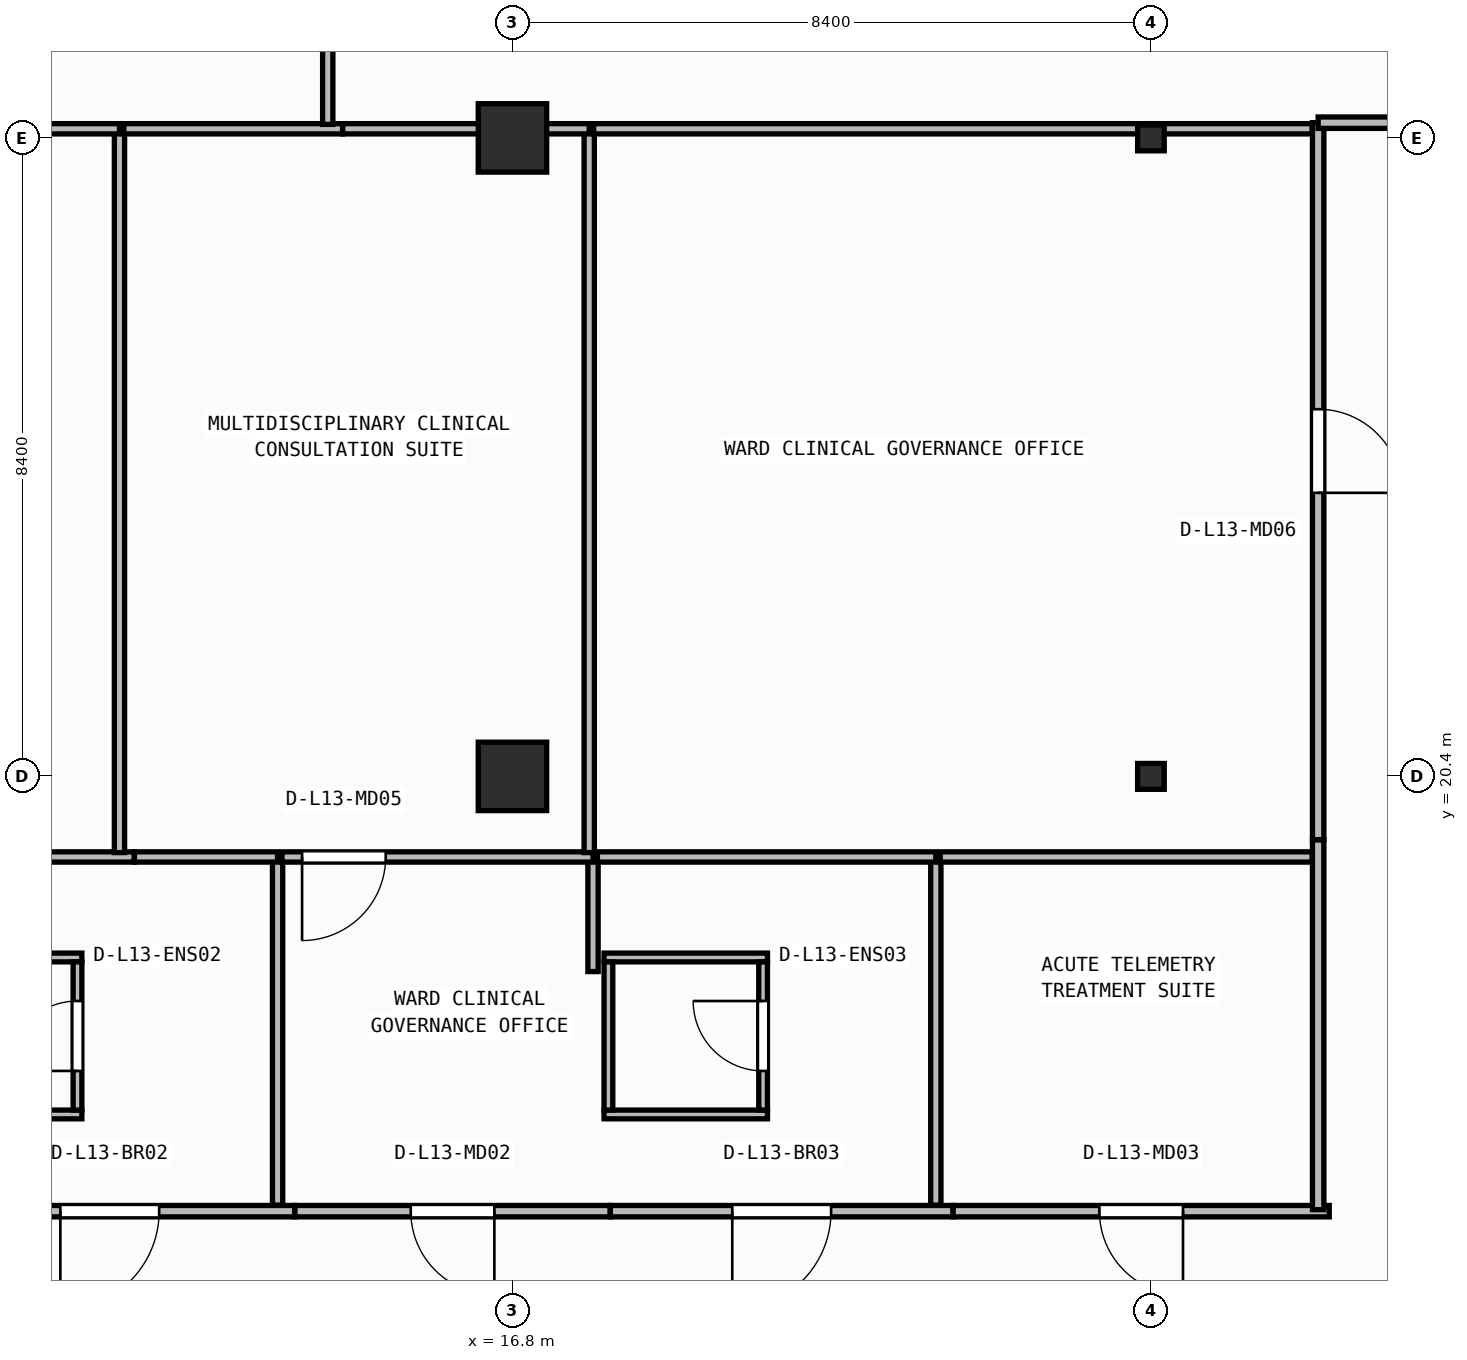
"""IFC4 building model, lengths in metres.
Left out: names, types, materials, properties, quantities, classifications, styles, units other than length and angle.
Written with IfcOpenShell. Run it as: python <this file> out.ifc"""

import sys

from ifc_helpers import new_model, si_unit, direction, frame, frame_2d, origin, origin_2d, place, context, subcontext, project, spatial, rectangle, i_section, extrude, element, fill, save


model = new_model("IFC4")
c1 = context("Model", 3, precision=1e-05, world=origin(), true_north=direction((0.0, 1.0)))
c2 = subcontext(c1, "Body", "Model", "MODEL_VIEW")
j1 = project(units=[si_unit("LENGTHUNIT", "METRE"), si_unit("PLANEANGLEUNIT", "RADIAN")], contexts=[c1])
p1 = place(None, origin())
s1 = spatial("IfcSite", under=j1, at=p1, CompositionType="ELEMENT")
p2 = place(p1, origin())
s2 = spatial("IfcBuilding", under=s1, at=p2, CompositionType="ELEMENT")
p3 = place(p2, frame((0.0, 0.0, 54.1)))
s3 = spatial("IfcBuildingStorey", under=s2, at=p3, CompositionType="ELEMENT", Elevation=54.1)
p4 = place(p3, frame((16.8, 20.4, 0.0), z_axis=(0.0, 0.0, 1.0), x_axis=(1.0, 0.0, 0.0)))
e1 = element("IfcColumn", 1, at=p4, inside=s3, PredefinedType="COLUMN", context=c2, shape_type="SweptSolid", body=[
    extrude(rectangle(XDim=0.9, YDim=0.9, at=origin_2d()), origin(), (0.0, 0.0, 1.0), 3.95),
])
p5 = place(p3, frame((25.2, 20.4, 0.0), z_axis=(0.0, 0.0, 1.0), x_axis=(1.0, 0.0, 0.0)))
e2 = element("IfcColumn", 2, at=p5, inside=s3, PredefinedType="COLUMN", context=c2, shape_type="SweptSolid", body=[
    extrude(i_section(OverallWidth=0.35, OverallDepth=0.34, WebThickness=0.016, FlangeThickness=0.028, at=origin_2d()), origin(), (0.0, 0.0, 1.0), 3.95),
])
p6 = place(p3, frame((16.8, 28.8, 0.0), z_axis=(0.0, 0.0, 1.0), x_axis=(1.0, 0.0, 0.0)))
e3 = element("IfcColumn", 3, at=p6, inside=s3, PredefinedType="COLUMN", context=c2, shape_type="SweptSolid", body=[
    extrude(rectangle(XDim=0.9, YDim=0.9, at=origin_2d()), origin(), (0.0, 0.0, 1.0), 3.95),
])
p7 = place(p3, frame((25.2, 28.8, 0.0), z_axis=(0.0, 0.0, 1.0), x_axis=(1.0, 0.0, 0.0)))
e4 = element("IfcColumn", 4, at=p7, inside=s3, PredefinedType="COLUMN", context=c2, shape_type="SweptSolid", body=[
    extrude(i_section(OverallWidth=0.35, OverallDepth=0.34, WebThickness=0.016, FlangeThickness=0.028, at=origin_2d()), origin(), (0.0, 0.0, 1.0), 3.95),
])
for number, where, z_axis, x_axis in (
    (5, (8.985, 15.952, 0.0), (0.0, 0.0, 1.0), (1.0, 0.0, 0.0)),
    (6, (8.985, 18.018, 0.0), (0.0, 0.0, 1.0), (1.0, 0.0, 0.0)),
):
    element("IfcWall", number, at=place(p3, frame(where, z_axis=z_axis, x_axis=x_axis)), inside=s3, PredefinedType="PARTITIONING", context=c2, shape_type="SweptSolid", body=[
        extrude(rectangle(XDim=2.15, YDim=0.115, at=frame_2d((1.075, 0.0))), origin(), (0.0, 0.0, 1.0), 3.71),
    ])
p8 = place(p3, frame((11.077, 16.01, 0.0), z_axis=(0.0, 0.0, 1.0), x_axis=(0.0, 1.0, 0.0)))
e7 = element("IfcWall", 7, at=p8, inside=s3, PredefinedType="PARTITIONING", context=c2, shape_type="SweptSolid", body=[
    extrude(rectangle(XDim=1.95, YDim=0.115, at=frame_2d((0.975, 0.0))), origin(), (0.0, 0.0, 1.0), 3.71),
])
p9 = place(p8, frame((0.515, 0.0, 0.0)))
e8 = element("IfcOpeningElement", 8, at=p9, cuts=e7, PredefinedType="OPENING", context=c2, shape_type="SweptSolid", body=[
    extrude(rectangle(XDim=0.92, YDim=2.1, at=frame_2d((0.46, 1.05))), frame((0.0, 0.067, 0.0), z_axis=(0.0, -1.0, 0.0), x_axis=(1.0, 0.0, 0.0)), (0.0, 0.0, 1.0), 0.135),
])
for number, where, z_axis, x_axis in (
    (9, (18.005, 15.952, 0.0), (0.0, 0.0, 1.0), (1.0, 0.0, 0.0)),
    (10, (18.005, 18.018, 0.0), (0.0, 0.0, 1.0), (1.0, 0.0, 0.0)),
):
    element("IfcWall", number, at=place(p3, frame(where, z_axis=z_axis, x_axis=x_axis)), inside=s3, PredefinedType="PARTITIONING", context=c2, shape_type="SweptSolid", body=[
        extrude(rectangle(XDim=2.15, YDim=0.115, at=frame_2d((1.075, 0.0))), origin(), (0.0, 0.0, 1.0), 3.71),
    ])
p10 = place(p3, frame((18.062, 16.01, 0.0), z_axis=(0.0, 0.0, 1.0), x_axis=(0.0, 1.0, 0.0)))
e11 = element("IfcWall", 11, at=p10, inside=s3, PredefinedType="PARTITIONING", context=c2, shape_type="SweptSolid", body=[
    extrude(rectangle(XDim=1.95, YDim=0.115, at=frame_2d((0.975, 0.0))), origin(), (0.0, 0.0, 1.0), 3.71),
])
p11 = place(p3, frame((20.097, 16.01, 0.0), z_axis=(0.0, 0.0, 1.0), x_axis=(0.0, 1.0, 0.0)))
e12 = element("IfcWall", 12, at=p11, inside=s3, PredefinedType="PARTITIONING", context=c2, shape_type="SweptSolid", body=[
    extrude(rectangle(XDim=1.95, YDim=0.115, at=frame_2d((0.975, 0.0))), origin(), (0.0, 0.0, 1.0), 3.71),
])
p12 = place(p11, frame((0.515, 0.0, 0.0)))
e13 = element("IfcOpeningElement", 13, at=p12, cuts=e12, PredefinedType="OPENING", context=c2, shape_type="SweptSolid", body=[
    extrude(rectangle(XDim=0.92, YDim=2.1, at=frame_2d((0.46, 1.05))), frame((0.0, 0.067, 0.0), z_axis=(0.0, -1.0, 0.0), x_axis=(1.0, 0.0, 0.0)), (0.0, 0.0, 1.0), 0.135),
])
p13 = place(p3, frame((13.936, 14.68, 0.0), z_axis=(0.0, 0.0, 1.0), x_axis=(-1.0, 0.0, 0.0)))
e14 = element("IfcWall", 14, at=p13, inside=s3, PredefinedType="PARTITIONING", context=c2, shape_type="SweptSolid", body=[
    extrude(rectangle(XDim=4.868, YDim=0.15, at=frame_2d((2.434, 0.0))), origin(), (0.0, 0.0, 1.0), 3.71),
])
p14 = place(p13, frame((1.784, 0.0, 0.0)))
e15 = element("IfcOpeningElement", 15, at=p14, cuts=e14, PredefinedType="OPENING", context=c2, shape_type="SweptSolid", body=[
    extrude(rectangle(XDim=1.3, YDim=2.15, at=frame_2d((0.65, 1.075))), frame((0.0, 0.085, 0.0), z_axis=(0.0, -1.0, 0.0), x_axis=(1.0, 0.0, 0.0)), (0.0, 0.0, 1.0), 0.17),
])
p15 = place(p3, frame((18.086, 14.68, 0.0), z_axis=(0.0, 0.0, 1.0), x_axis=(-1.0, 0.0, 0.0)))
e16 = element("IfcWall", 16, at=p15, inside=s3, PredefinedType="PARTITIONING", context=c2, shape_type="SweptSolid", body=[
    extrude(rectangle(XDim=4.148, YDim=0.15, at=frame_2d((2.074, 0.0))), origin(), (0.0, 0.0, 1.0), 3.71),
])
p16 = place(p15, frame((1.524, 0.0, 0.0)))
e17 = element("IfcOpeningElement", 17, at=p16, cuts=e16, PredefinedType="OPENING", context=c2, shape_type="SweptSolid", body=[
    extrude(rectangle(XDim=1.1, YDim=2.1, at=frame_2d((0.55, 1.05))), frame((0.0, 0.085, 0.0), z_axis=(0.0, -1.0, 0.0), x_axis=(1.0, 0.0, 0.0)), (0.0, 0.0, 1.0), 0.17),
])
p17 = place(p3, frame((22.596, 14.68, 0.0), z_axis=(0.0, 0.0, 1.0), x_axis=(-1.0, 0.0, 0.0)))
e18 = element("IfcWall", 18, at=p17, inside=s3, PredefinedType="PARTITIONING", context=c2, shape_type="SweptSolid", body=[
    extrude(rectangle(XDim=4.508, YDim=0.15, at=frame_2d((2.254, 0.0))), origin(), (0.0, 0.0, 1.0), 3.71),
])
p18 = place(p17, frame((1.604, 0.0, 0.0)))
e19 = element("IfcOpeningElement", 19, at=p18, cuts=e18, PredefinedType="OPENING", context=c2, shape_type="SweptSolid", body=[
    extrude(rectangle(XDim=1.3, YDim=2.15, at=frame_2d((0.65, 1.075))), frame((0.0, 0.085, 0.0), z_axis=(0.0, -1.0, 0.0), x_axis=(1.0, 0.0, 0.0)), (0.0, 0.0, 1.0), 0.17),
])
p19 = place(p3, frame((27.546, 14.68, 0.0), z_axis=(0.0, 0.0, 1.0), x_axis=(-1.0, 0.0, 0.0)))
e20 = element("IfcWall", 20, at=p19, inside=s3, PredefinedType="PARTITIONING", context=c2, shape_type="SweptSolid", body=[
    extrude(rectangle(XDim=4.948, YDim=0.15, at=frame_2d((2.474, 0.0))), origin(), (0.0, 0.0, 1.0), 3.71),
])
p20 = place(p19, frame((1.924, 0.0, 0.0)))
e21 = element("IfcOpeningElement", 21, at=p20, cuts=e20, PredefinedType="OPENING", context=c2, shape_type="SweptSolid", body=[
    extrude(rectangle(XDim=1.1, YDim=2.1, at=frame_2d((0.55, 1.05))), frame((0.0, 0.085, 0.0), z_axis=(0.0, -1.0, 0.0), x_axis=(1.0, 0.0, 0.0)), (0.0, 0.0, 1.0), 0.17),
])
p21 = place(p3, frame((27.4, 19.566, 0.0), z_axis=(0.0, 0.0, 1.0), x_axis=(0.0, -1.0, 0.0)))
e22 = element("IfcWall", 22, at=p21, inside=s3, PredefinedType="PARTITIONING", context=c2, shape_type="SweptSolid", body=[
    extrude(rectangle(XDim=4.866, YDim=0.15, at=frame_2d((2.433, 0.0))), origin(), (0.0, 0.0, 1.0), 3.71),
])
p22 = place(p3, frame((27.4, 29.0, 0.0), z_axis=(0.0, 0.0, 1.0), x_axis=(0.0, -1.0, 0.0)))
e23 = element("IfcWall", 23, at=p22, inside=s3, PredefinedType="PARTITIONING", context=c2, shape_type="SweptSolid", body=[
    extrude(rectangle(XDim=9.432, YDim=0.15, at=frame_2d((4.716, 0.0))), origin(), (0.0, 0.0, 1.0), 3.71),
])
p23 = place(p22, frame((3.769, 0.0, 0.0)))
e24 = element("IfcOpeningElement", 24, at=p23, cuts=e23, PredefinedType="OPENING", context=c2, shape_type="SweptSolid", body=[
    extrude(rectangle(XDim=1.1, YDim=2.1, at=frame_2d((0.55, 1.05))), frame((0.0, 0.085, 0.0), z_axis=(0.0, -1.0, 0.0), x_axis=(1.0, 0.0, 0.0)), (0.0, 0.0, 1.0), 0.17),
])
p24 = place(p3, frame((29.9, 29.0, 0.0), z_axis=(0.0, 0.0, 1.0), x_axis=(-1.0, 0.0, 0.0)))
e25 = element("IfcWall", 25, at=p24, inside=s3, PredefinedType="PARTITIONING", context=c2, shape_type="SweptSolid", body=[
    extrude(rectangle(XDim=2.5, YDim=0.15, at=frame_2d((1.25, 0.0))), origin(), (0.0, 0.0, 1.0), 3.326),
])
p25 = place(p24, frame((0.225, 0.0, 0.0)))
e26 = element("IfcOpeningElement", 26, at=p25, cuts=e25, PredefinedType="OPENING", context=c2, shape_type="SweptSolid", body=[
    extrude(rectangle(XDim=1.1, YDim=2.1, at=frame_2d((0.55, 1.05))), frame((0.0, 0.085, 0.0), z_axis=(0.0, -1.0, 0.0), x_axis=(1.0, 0.0, 0.0)), (0.0, 0.0, 1.0), 0.17),
])
p26 = place(p3, frame((13.71, 14.76, 0.0), z_axis=(0.0, 0.0, 1.0), x_axis=(0.0, 1.0, 0.0)))
e27 = element("IfcWall", 27, at=p26, inside=s3, PredefinedType="PARTITIONING", context=c2, shape_type="SweptSolid", body=[
    extrude(rectangle(XDim=4.58, YDim=0.135, at=frame_2d((2.29, 0.0))), origin(), (0.0, 0.0, 1.0), 3.71),
])
p27 = place(p3, frame((11.825, 19.34, 0.0), z_axis=(0.0, 0.0, 1.0), x_axis=(-1.0, 0.0, 0.0)))
e28 = element("IfcWall", 28, at=p27, inside=s3, PredefinedType="PARTITIONING", context=c2, shape_type="SweptSolid", body=[
    extrude(rectangle(XDim=2.927, YDim=0.135, at=frame_2d((1.464, 0.0))), origin(), (0.0, 0.0, 1.0), 3.71),
])
p28 = place(p3, frame((13.71, 19.34, 0.0), z_axis=(0.0, 0.0, 1.0), x_axis=(-1.0, 0.0, 0.0)))
e29 = element("IfcWall", 29, at=p28, inside=s3, PredefinedType="PARTITIONING", context=c2, shape_type="SweptSolid", body=[
    extrude(rectangle(XDim=1.883, YDim=0.135, at=frame_2d((0.942, 0.0))), origin(), (0.0, 0.0, 1.0), 3.71),
])
p29 = place(p3, frame((17.86, 17.833, 0.0), z_axis=(0.0, 0.0, 1.0), x_axis=(0.0, 1.0, 0.0)))
e30 = element("IfcWall", 30, at=p29, inside=s3, PredefinedType="PARTITIONING", context=c2, shape_type="SweptSolid", body=[
    extrude(rectangle(XDim=1.508, YDim=0.135, at=frame_2d((0.754, 0.0))), origin(), (0.0, 0.0, 1.0), 3.71),
])
p30 = place(p3, frame((17.86, 19.34, 0.0), z_axis=(0.0, 0.0, 1.0), x_axis=(-1.0, 0.0, 0.0)))
e31 = element("IfcWall", 31, at=p30, inside=s3, PredefinedType="PARTITIONING", context=c2, shape_type="SweptSolid", body=[
    extrude(rectangle(XDim=4.093, YDim=0.135, at=frame_2d((2.046, 0.0))), origin(), (0.0, 0.0, 1.0), 3.71),
])
p31 = place(p30, frame((2.728, 0.0, 0.0)))
e32 = element("IfcOpeningElement", 32, at=p31, cuts=e31, PredefinedType="OPENING", context=c2, shape_type="SweptSolid", body=[
    extrude(rectangle(XDim=1.1, YDim=2.1, at=frame_2d((0.55, 1.05))), frame((0.0, 0.077, 0.0), z_axis=(0.0, -1.0, 0.0), x_axis=(1.0, 0.0, 0.0)), (0.0, 0.0, 1.0), 0.155),
])
p32 = place(p3, frame((22.37, 14.76, 0.0), z_axis=(0.0, 0.0, 1.0), x_axis=(0.0, 1.0, 0.0)))
e33 = element("IfcWall", 33, at=p32, inside=s3, PredefinedType="PARTITIONING", context=c2, shape_type="SweptSolid", body=[
    extrude(rectangle(XDim=4.58, YDim=0.135, at=frame_2d((2.29, 0.0))), origin(), (0.0, 0.0, 1.0), 3.71),
])
p33 = place(p3, frame((22.37, 19.34, 0.0), z_axis=(0.0, 0.0, 1.0), x_axis=(-1.0, 0.0, 0.0)))
e34 = element("IfcWall", 34, at=p33, inside=s3, PredefinedType="PARTITIONING", context=c2, shape_type="SweptSolid", body=[
    extrude(rectangle(XDim=4.453, YDim=0.135, at=frame_2d((2.226, 0.0))), origin(), (0.0, 0.0, 1.0), 3.71),
])
p34 = place(p3, frame((27.32, 19.34, 0.0), z_axis=(0.0, 0.0, 1.0), x_axis=(-1.0, 0.0, 0.0)))
e35 = element("IfcWall", 35, at=p34, inside=s3, PredefinedType="PARTITIONING", context=c2, shape_type="SweptSolid", body=[
    extrude(rectangle(XDim=4.893, YDim=0.135, at=frame_2d((2.446, 0.0))), origin(), (0.0, 0.0, 1.0), 3.71),
])
p35 = place(p3, frame((11.63, 19.397, 0.0), z_axis=(0.0, 0.0, 1.0), x_axis=(0.0, 1.0, 0.0)))
e36 = element("IfcWall", 36, at=p35, inside=s3, PredefinedType="PARTITIONING", context=c2, shape_type="SweptSolid", body=[
    extrude(rectangle(XDim=9.522, YDim=0.135, at=frame_2d((4.761, 0.0))), origin(), (0.0, 0.0, 1.0), 3.71),
])
p36 = place(p3, frame((11.63, 28.92, 0.0), z_axis=(0.0, 0.0, 1.0), x_axis=(-1.0, 0.0, 0.0)))
e37 = element("IfcWall", 37, at=p36, inside=s3, PredefinedType="PARTITIONING", context=c2, shape_type="SweptSolid", body=[
    extrude(rectangle(XDim=11.39, YDim=0.135, at=frame_2d((5.695, 0.0))), origin(), (0.0, 0.0, 1.0), 3.073),
])
p37 = place(p36, frame((6.134, 0.0, 0.0)))
e38 = element("IfcOpeningElement", 38, at=p37, cuts=e37, PredefinedType="OPENING", context=c2, shape_type="SweptSolid", body=[
    extrude(rectangle(XDim=1.1, YDim=2.1, at=frame_2d((0.55, 1.05))), frame((0.0, 0.077, 0.0), z_axis=(0.0, -1.0, 0.0), x_axis=(1.0, 0.0, 0.0)), (0.0, 0.0, 1.0), 0.155),
])
p38 = place(p3, frame((17.81, 19.397, 0.0), z_axis=(0.0, 0.0, 1.0), x_axis=(0.0, 1.0, 0.0)))
e39 = element("IfcWall", 39, at=p38, inside=s3, PredefinedType="PARTITIONING", context=c2, shape_type="SweptSolid", body=[
    extrude(rectangle(XDim=9.522, YDim=0.135, at=frame_2d((4.761, 0.0))), origin(), (0.0, 0.0, 1.0), 3.71),
])
p39 = place(p3, frame((14.565, 28.92, 0.0), z_axis=(0.0, 0.0, 1.0), x_axis=(-1.0, 0.0, 0.0)))
e40 = element("IfcWall", 40, at=p39, inside=s3, PredefinedType="PARTITIONING", context=c2, shape_type="SweptSolid", body=[
    extrude(rectangle(XDim=2.877, YDim=0.135, at=frame_2d((1.438, 0.0))), origin(), (0.0, 0.0, 1.0), 3.073),
])
p40 = place(p3, frame((17.81, 28.92, 0.0), z_axis=(0.0, 0.0, 1.0), x_axis=(-1.0, 0.0, 0.0)))
e41 = element("IfcWall", 41, at=p40, inside=s3, PredefinedType="PARTITIONING", context=c2, shape_type="SweptSolid", body=[
    extrude(rectangle(XDim=3.243, YDim=0.135, at=frame_2d((1.622, 0.0))), origin(), (0.0, 0.0, 1.0), 3.073),
])
p41 = place(p3, frame((27.32, 28.92, 0.0), z_axis=(0.0, 0.0, 1.0), x_axis=(-1.0, 0.0, 0.0)))
e42 = element("IfcWall", 42, at=p41, inside=s3, PredefinedType="PARTITIONING", context=c2, shape_type="SweptSolid", body=[
    extrude(rectangle(XDim=9.453, YDim=0.135, at=frame_2d((4.726, 0.0))), origin(), (0.0, 0.0, 1.0), 3.073),
])
p42 = place(p3, frame((14.37, 28.978, 0.0), z_axis=(0.0, 0.0, 1.0), x_axis=(0.0, 1.0, 0.0)))
e43 = element("IfcWall", 43, at=p42, inside=s3, PredefinedType="PARTITIONING", context=c2, shape_type="SweptSolid", body=[
    extrude(rectangle(XDim=7.222, YDim=0.135, at=frame_2d((3.611, 0.0))), origin(), (0.0, 0.0, 1.0), 3.71),
])
p43 = place(p9, origin())
e44 = element("IfcDoor", 44, at=p43, inside=s3, OperationType="SINGLE_SWING_LEFT", PredefinedType="DOOR", context=c2, shape_type="SweptSolid", body=[
    extrude(rectangle(XDim=0.92, YDim=2.1, at=frame_2d((0.46, 1.05))), frame((0.0, 0.025, 0.0), z_axis=(0.0, -1.0, 0.0), x_axis=(1.0, 0.0, 0.0)), (0.0, 0.0, 1.0), 0.05),
])
fill(e8, e44)
p44 = place(p12, origin())
e45 = element("IfcDoor", 45, at=p44, inside=s3, OperationType="SINGLE_SWING_RIGHT", PredefinedType="DOOR", context=c2, shape_type="SweptSolid", body=[
    extrude(rectangle(XDim=0.92, YDim=2.1, at=frame_2d((0.46, 1.05))), frame((0.0, 0.025, 0.0), z_axis=(0.0, -1.0, 0.0), x_axis=(1.0, 0.0, 0.0)), (0.0, 0.0, 1.0), 0.05),
])
fill(e13, e45)
p45 = place(p14, origin())
e46 = element("IfcDoor", 46, at=p45, inside=s3, OperationType="SINGLE_SWING_RIGHT", PredefinedType="DOOR", context=c2, shape_type="SweptSolid", body=[
    extrude(rectangle(XDim=1.3, YDim=2.15, at=frame_2d((0.65, 1.075))), frame((0.0, 0.025, 0.0), z_axis=(0.0, -1.0, 0.0), x_axis=(1.0, 0.0, 0.0)), (0.0, 0.0, 1.0), 0.05),
])
fill(e15, e46)
p46 = place(p16, origin())
e47 = element("IfcDoor", 47, at=p46, inside=s3, OperationType="SINGLE_SWING_LEFT", PredefinedType="DOOR", context=c2, shape_type="SweptSolid", body=[
    extrude(rectangle(XDim=1.1, YDim=2.1, at=frame_2d((0.55, 1.05))), frame((0.0, 0.025, 0.0), z_axis=(0.0, -1.0, 0.0), x_axis=(1.0, 0.0, 0.0)), (0.0, 0.0, 1.0), 0.05),
])
fill(e17, e47)
p47 = place(p18, origin())
e48 = element("IfcDoor", 48, at=p47, inside=s3, OperationType="SINGLE_SWING_RIGHT", PredefinedType="DOOR", context=c2, shape_type="SweptSolid", body=[
    extrude(rectangle(XDim=1.3, YDim=2.15, at=frame_2d((0.65, 1.075))), frame((0.0, 0.025, 0.0), z_axis=(0.0, -1.0, 0.0), x_axis=(1.0, 0.0, 0.0)), (0.0, 0.0, 1.0), 0.05),
])
fill(e19, e48)
p48 = place(p20, origin())
e49 = element("IfcDoor", 49, at=p48, inside=s3, OperationType="SINGLE_SWING_LEFT", PredefinedType="DOOR", context=c2, shape_type="SweptSolid", body=[
    extrude(rectangle(XDim=1.1, YDim=2.1, at=frame_2d((0.55, 1.05))), frame((0.0, 0.025, 0.0), z_axis=(0.0, -1.0, 0.0), x_axis=(1.0, 0.0, 0.0)), (0.0, 0.0, 1.0), 0.05),
])
fill(e21, e49)
p49 = place(p23, origin())
e50 = element("IfcDoor", 50, at=p49, inside=s3, OperationType="SINGLE_SWING_RIGHT", PredefinedType="DOOR", context=c2, shape_type="SweptSolid", body=[
    extrude(rectangle(XDim=1.1, YDim=2.1, at=frame_2d((0.55, 1.05))), frame((0.0, 0.025, 0.0), z_axis=(0.0, -1.0, 0.0), x_axis=(1.0, 0.0, 0.0)), (0.0, 0.0, 1.0), 0.05),
])
fill(e24, e50)
p50 = place(p31, origin())
e51 = element("IfcDoor", 51, at=p50, inside=s3, OperationType="SINGLE_SWING_RIGHT", PredefinedType="DOOR", context=c2, shape_type="SweptSolid", body=[
    extrude(rectangle(XDim=1.1, YDim=2.1, at=frame_2d((0.55, 1.05))), frame((0.0, 0.025, 0.0), z_axis=(0.0, -1.0, 0.0), x_axis=(1.0, 0.0, 0.0)), (0.0, 0.0, 1.0), 0.05),
])
fill(e32, e51)
save(model, sys.argv[1])
